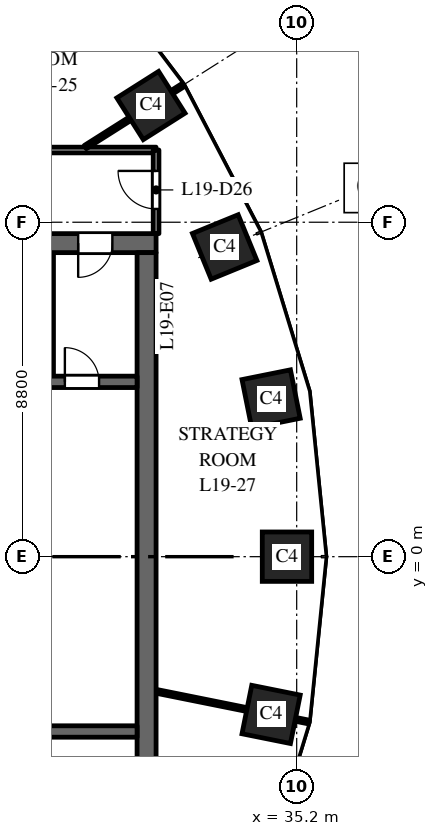
"""IFC4 building model, lengths in metres.
Left out: names, types, materials, properties, quantities, classifications, styles, units other than length and angle.
Written with IfcOpenShell. Run it as: python <this file> out.ifc"""

import sys

from ifc_helpers import new_model, si_unit, direction, frame, frame_2d, origin, origin_2d, place, context, subcontext, project, spatial, rectangle, extrude, element, fill, save


model = new_model("IFC4")
c1 = context("Model", 3, precision=1e-05, world=origin(), true_north=direction((0.0, 1.0)))
c2 = subcontext(c1, "Body", "Model", "MODEL_VIEW")
j1 = project(units=[si_unit("LENGTHUNIT", "METRE"), si_unit("PLANEANGLEUNIT", "RADIAN")], contexts=[c1])
p1 = place(None, origin())
s1 = spatial("IfcSite", under=j1, at=p1, CompositionType="ELEMENT")
p2 = place(p1, origin())
s2 = spatial("IfcBuilding", under=s1, at=p2, CompositionType="ELEMENT")
p3 = place(p2, frame((0.0, 0.0, 88.0)))
s3 = spatial("IfcBuildingStorey", under=s2, at=p3, CompositionType="ELEMENT", Elevation=88.0)
for number, where, z_axis, x_axis in (
    (1, (34.945, 0.0, 0.0), (0.0, 0.0, 1.0), (0.0, 1.0, 0.0)),
    (2, (34.527, 4.151, 0.0), (0.0, 0.0, 1.0), (-0.197, 0.98, 0.0)),
    (3, (33.305, 8.149, 0.0), (0.0, 0.0, 1.0), (-0.379, 0.925, 0.0)),
    (4, (31.365, 11.871, 0.0), (0.0, 0.0, 1.0), (-0.535, 0.845, 0.0)),
    (5, (34.527, -4.151, 0.0), (0.0, 0.0, 1.0), (0.197, 0.98, 0.0)),
):
    element("IfcColumn", number, at=place(p3, frame(where, z_axis=z_axis, x_axis=x_axis)), inside=s3, PredefinedType="COLUMN", context=c2, shape_type="SweptSolid", body=[
        extrude(rectangle(XDim=1.3, YDim=1.3, at=origin_2d()), origin(), (0.0, 0.0, 1.0), 4.0),
    ])
p4 = place(p3, frame((16.5, 8.25, 0.0), z_axis=(0.0, 0.0, 1.0), x_axis=(1.0, 0.0, 0.0)))
e6 = element("IfcWall", 6, at=p4, inside=s3, PredefinedType="SHEAR", context=c2, shape_type="SweptSolid", body=[
    extrude(rectangle(XDim=15.0, YDim=0.5, at=frame_2d((7.5, 0.0))), origin(), (0.0, 0.0, 1.0), 3.7),
])
p5 = place(p4, frame((6.9, 0.0, 0.0)))
e7 = element("IfcOpeningElement", 7, at=p5, cuts=e6, PredefinedType="OPENING", context=c2, shape_type="SweptSolid", body=[
    extrude(rectangle(XDim=1.2, YDim=2.1, at=frame_2d((0.6, 1.05))), frame((0.0, 0.26, 0.0), z_axis=(0.0, -1.0, 0.0), x_axis=(1.0, 0.0, 0.0)), (0.0, 0.0, 1.0), 0.52),
])
p6 = place(p4, frame((12.95, 0.0, 0.0)))
e8 = element("IfcOpeningElement", 8, at=p6, cuts=e6, PredefinedType="OPENING", context=c2, shape_type="SweptSolid", body=[
    extrude(rectangle(XDim=0.9, YDim=2.1, at=frame_2d((0.45, 1.05))), frame((0.0, 0.26, 0.0), z_axis=(0.0, -1.0, 0.0), x_axis=(1.0, 0.0, 0.0)), (0.0, 0.0, 1.0), 0.52),
])
p7 = place(p3, frame((31.25, -8.0, 0.0), z_axis=(0.0, 0.0, 1.0), x_axis=(0.0, 1.0, 0.0)))
e9 = element("IfcWall", 9, at=p7, inside=s3, PredefinedType="SHEAR", context=c2, shape_type="SweptSolid", body=[
    extrude(rectangle(XDim=16.0, YDim=0.5, at=frame_2d((8.0, 0.0))), origin(), (0.0, 0.0, 1.0), 3.7),
])
p8 = place(p3, frame((24.9, 4.6, 0.0), z_axis=(0.0, 0.0, 1.0), x_axis=(1.0, 0.0, 0.0)))
e10 = element("IfcWall", 10, at=p8, inside=s3, PredefinedType="SHEAR", context=c2, shape_type="SweptSolid", body=[
    extrude(rectangle(XDim=6.1, YDim=0.3, at=frame_2d((3.05, 0.0))), origin(), (0.0, 0.0, 1.0), 3.7),
])
p9 = place(p8, frame((4.2, 0.0, 0.0)))
e11 = element("IfcOpeningElement", 11, at=p9, cuts=e10, PredefinedType="OPENING", context=c2, shape_type="SweptSolid", body=[
    extrude(rectangle(XDim=0.9, YDim=2.1, at=frame_2d((0.45, 1.05))), frame((0.0, 0.16, 0.0), z_axis=(0.0, -1.0, 0.0), x_axis=(1.0, 0.0, 0.0)), (0.0, 0.0, 1.0), 0.32),
])
p10 = place(p3, frame((28.7, 4.75, 0.0), z_axis=(0.0, 0.0, 1.0), x_axis=(0.0, 1.0, 0.0)))
e12 = element("IfcWall", 12, at=p10, inside=s3, PredefinedType="PARTITIONING", context=c2, shape_type="SweptSolid", body=[
    extrude(rectangle(XDim=3.25, YDim=0.2, at=frame_2d((1.625, 0.0))), origin(), (0.0, 0.0, 1.0), 3.7),
])
p11 = place(p3, frame((24.9, -4.6, 0.0), z_axis=(0.0, 0.0, 1.0), x_axis=(1.0, 0.0, 0.0)))
e13 = element("IfcWall", 13, at=p11, inside=s3, PredefinedType="SHEAR", context=c2, shape_type="SweptSolid", body=[
    extrude(rectangle(XDim=6.1, YDim=0.3, at=frame_2d((3.05, 0.0))), origin(), (0.0, 0.0, 1.0), 3.7),
])
p12 = place(p3, frame((23.011, 10.7, 0.0), z_axis=(0.0, 0.0, 1.0), x_axis=(1.0, 0.0, 0.0)))
e14 = element("IfcWall", 14, at=p12, inside=s3, PredefinedType="PARTITIONING", context=c2, shape_type="SweptSolid", body=[
    extrude(rectangle(XDim=8.489, YDim=0.15, at=frame_2d((4.245, 0.0))), origin(), (0.0, 0.0, 1.0), 2.9),
])
p13 = place(p12, frame((2.61, 0.0, 0.0)))
e15 = element("IfcOpeningElement", 15, at=p13, cuts=e14, PredefinedType="OPENING", context=c2, shape_type="SweptSolid", body=[
    extrude(rectangle(XDim=1.0, YDim=2.1, at=frame_2d((0.5, 1.05))), frame((0.0, 0.085, 0.0), z_axis=(0.0, -1.0, 0.0), x_axis=(1.0, 0.0, 0.0)), (0.0, 0.0, 1.0), 0.17),
])
p14 = place(p3, frame((29.637, 10.777, 0.0), z_axis=(0.0, 0.0, 1.0), x_axis=(0.844810627195, 0.535065420467, 0.0)))
e16 = element("IfcWall", 16, at=p14, inside=s3, PredefinedType="PARTITIONING", context=c2, shape_type="SweptSolid", body=[
    extrude(rectangle(XDim=3.048, YDim=0.1, at=frame_2d((1.524, 0.0))), origin(), (0.0, 0.0, 1.0), 2.9),
])
p15 = place(p3, frame((31.5, -3.542, 0.0), z_axis=(0.0, 0.0, 1.0), x_axis=(0.980357474535, -0.197228857227, 0.0)))
e17 = element("IfcWall", 17, at=p15, inside=s3, PredefinedType="PARTITIONING", context=c2, shape_type="SweptSolid", body=[
    extrude(rectangle(XDim=4.092, YDim=0.1, at=frame_2d((2.046, 0.0))), origin(), (0.0, 0.0, 1.0), 2.9),
])
p16 = place(p3, frame((31.5, 8.5, 0.0), z_axis=(0.0, 0.0, 1.0), x_axis=(0.0, 1.0, 0.0)))
e18 = element("IfcWall", 18, at=p16, inside=s3, PredefinedType="PARTITIONING", context=c2, shape_type="SweptSolid", body=[
    extrude(rectangle(XDim=2.2, YDim=0.15, at=frame_2d((1.1, 0.0))), origin(), (0.0, 0.0, 1.0), 2.9),
])
p17 = place(p16, frame((0.65, 0.0, 0.0)))
e19 = element("IfcOpeningElement", 19, at=p17, cuts=e18, PredefinedType="OPENING", context=c2, shape_type="SweptSolid", body=[
    extrude(rectangle(XDim=1.0, YDim=2.1, at=frame_2d((0.5, 1.05))), frame((0.0, 0.085, 0.0), z_axis=(0.0, -1.0, 0.0), x_axis=(1.0, 0.0, 0.0)), (0.0, 0.0, 1.0), 0.17),
])
p18 = place(p6, origin())
e20 = element("IfcDoor", 20, at=p18, inside=s3, OperationType="SINGLE_SWING_LEFT", PredefinedType="DOOR", context=c2, shape_type="SweptSolid", body=[
    extrude(rectangle(XDim=0.9, YDim=2.1, at=frame_2d((0.45, 1.05))), frame((0.0, 0.025, 0.0), z_axis=(0.0, -1.0, 0.0), x_axis=(1.0, 0.0, 0.0)), (0.0, 0.0, 1.0), 0.05),
])
fill(e8, e20)
p19 = place(p9, origin())
e21 = element("IfcDoor", 21, at=p19, inside=s3, OperationType="SINGLE_SWING_RIGHT", PredefinedType="DOOR", context=c2, shape_type="SweptSolid", body=[
    extrude(rectangle(XDim=0.9, YDim=2.1, at=frame_2d((0.45, 1.05))), frame((0.0, 0.025, 0.0), z_axis=(0.0, -1.0, 0.0), x_axis=(1.0, 0.0, 0.0)), (0.0, 0.0, 1.0), 0.05),
])
fill(e11, e21)
p20 = place(p17, origin())
e22 = element("IfcDoor", 22, at=p20, inside=s3, OperationType="SINGLE_SWING_RIGHT", PredefinedType="DOOR", context=c2, shape_type="SweptSolid", body=[
    extrude(rectangle(XDim=1.0, YDim=2.1, at=frame_2d((0.5, 1.05))), frame((0.0, 0.025, 0.0), z_axis=(0.0, -1.0, 0.0), x_axis=(1.0, 0.0, 0.0)), (0.0, 0.0, 1.0), 0.05),
])
fill(e19, e22)
save(model, sys.argv[1])
